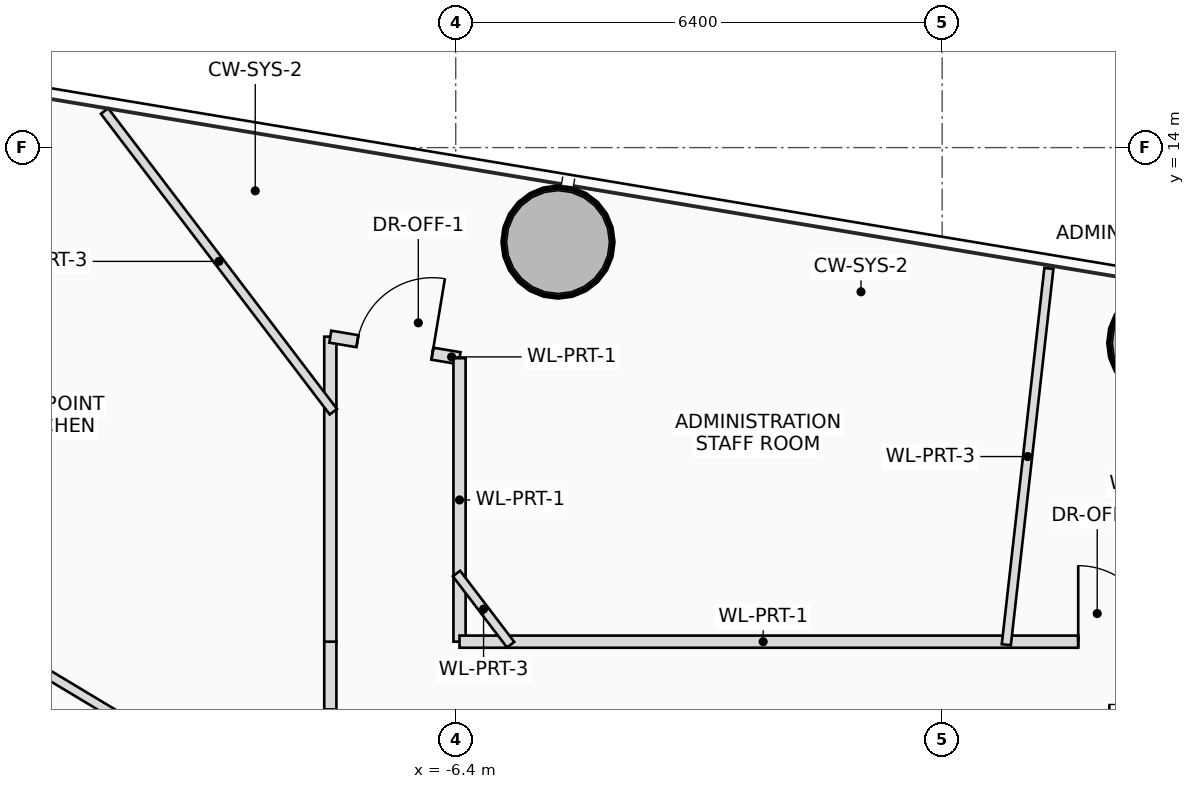
"""IFC4 building model, lengths in metres.
Left out: names, types, materials, properties, quantities, classifications, styles, units other than length and angle.
Written with IfcOpenShell. Run it as: python <this file> out.ifc"""

import sys

from ifc_helpers import new_model, si_unit, direction, frame, frame_2d, origin, origin_2d, place, context, subcontext, project, spatial, rectangle, hollow_circle, extrude, source, transform, mapped, element, fill, save


model = new_model("IFC4")
c1 = context("Model", 3, precision=1e-05, world=origin(), true_north=direction((0.0, 1.0)))
c2 = subcontext(c1, "Body", "Model", "MODEL_VIEW")
j1 = project(units=[si_unit("LENGTHUNIT", "METRE"), si_unit("PLANEANGLEUNIT", "RADIAN")], contexts=[c1])
p1 = place(None, origin())
s1 = spatial("IfcSite", under=j1, at=p1, CompositionType="ELEMENT")
p2 = place(p1, origin())
s2 = spatial("IfcBuilding", under=s1, at=p2, CompositionType="ELEMENT")
p3 = place(p2, frame((0.0, 0.0, 89.9)))
s3 = spatial("IfcBuildingStorey", under=s2, at=p3, CompositionType="ELEMENT", Elevation=89.9)
m1 = source(origin(), c2, "Body", "SweptSolid", [
    extrude(hollow_circle(Radius=0.725, WallThickness=0.05, at=origin_2d()), origin(), (0.0, 0.0, 1.0), 3.75),
])
for number, where, z_axis, x_axis in (
    (1, (2.915, 11.429, 0.0), (0.0, 0.0, 1.0), (1.0, 0.0, 0.0)),
    (2, (-5.054, 12.757, 0.0), (0.0, 0.0, 1.0), (1.0, 0.0, 0.0)),
):
    element("IfcColumn", number, at=place(p3, frame(where, z_axis=z_axis, x_axis=x_axis)), inside=s3, PredefinedType="COLUMN", context=c2, shape_type="MappedRepresentation", body=[
        mapped(m1, transform((0.0, 0.0, 0.0), scale=1.0)),
    ])
p4 = place(p3, frame((-8.05, -7.5, 0.0), z_axis=(0.0, 0.0, 1.0), x_axis=(0.0, 1.0, 0.0)))
e3 = element("IfcWall", 3, at=p4, inside=s3, PredefinedType="PARTITIONING", context=c2, shape_type="SweptSolid", body=[
    extrude(rectangle(XDim=15.0, YDim=0.16, at=frame_2d((7.5, 0.0))), origin(), (0.0, 0.0, 1.0), 2.85),
])
p5 = place(p4, frame((3.292, 0.0, 0.0)))
e4 = element("IfcOpeningElement", 4, at=p5, cuts=e3, PredefinedType="OPENING", context=c2, shape_type="SweptSolid", body=[
    extrude(rectangle(XDim=1.0, YDim=2.25, at=frame_2d((0.5, 1.125))), frame((0.0, 0.09, 0.0), z_axis=(0.0, -1.0, 0.0), x_axis=(1.0, 0.0, 0.0)), (0.0, 0.0, 1.0), 0.18),
])
p6 = place(p4, frame((8.524, 0.0, 0.0)))
e5 = element("IfcOpeningElement", 5, at=p6, cuts=e3, PredefinedType="OPENING", context=c2, shape_type="SweptSolid", body=[
    extrude(rectangle(XDim=1.0, YDim=2.25, at=frame_2d((0.5, 1.125))), frame((0.0, 0.09, 0.0), z_axis=(0.0, -1.0, 0.0), x_axis=(1.0, 0.0, 0.0)), (0.0, 0.0, 1.0), 0.18),
])
p7 = place(p4, frame((13.105, 0.0, 0.0)))
e6 = element("IfcOpeningElement", 6, at=p7, cuts=e3, PredefinedType="OPENING", context=c2, shape_type="SweptSolid", body=[
    extrude(rectangle(XDim=1.0, YDim=2.25, at=frame_2d((0.5, 1.125))), frame((0.0, 0.09, 0.0), z_axis=(0.0, -1.0, 0.0), x_axis=(1.0, 0.0, 0.0)), (0.0, 0.0, 1.0), 0.18),
])
p8 = place(p3, frame((-8.05, 7.5, 0.0), z_axis=(0.0, 0.0, 1.0), x_axis=(0.0, 1.0, 0.0)))
e7 = element("IfcWall", 7, at=p8, inside=s3, PredefinedType="PARTITIONING", context=c2, shape_type="SweptSolid", body=[
    extrude(rectangle(XDim=4.012, YDim=0.16, at=frame_2d((2.006, 0.0))), origin(), (0.0, 0.0, 1.0), 2.85),
])
p9 = place(p3, frame((-8.05, 11.512, 0.0), z_axis=(0.0, 0.0, 1.0), x_axis=(0.986405407683, -0.164330069354, 0.0)))
e8 = element("IfcWall", 8, at=p9, inside=s3, PredefinedType="PARTITIONING", context=c2, shape_type="SweptSolid", body=[
    extrude(rectangle(XDim=1.723, YDim=0.16, at=frame_2d((0.862, 0.0))), origin(), (0.0, 0.0, 1.0), 3.545),
])
p10 = place(p9, frame((0.362, 0.0, 0.0)))
e9 = element("IfcOpeningElement", 9, at=p10, cuts=e8, PredefinedType="OPENING", context=c2, shape_type="SweptSolid", body=[
    extrude(rectangle(XDim=1.0, YDim=2.25, at=frame_2d((0.5, 1.125))), frame((0.0, 0.09, 0.0), z_axis=(0.0, -1.0, 0.0), x_axis=(1.0, 0.0, 0.0)), (0.0, 0.0, 1.0), 0.18),
])
p11 = place(p3, frame((-6.35, 11.229, 0.0), z_axis=(0.0, 0.0, 1.0), x_axis=(0.0, -1.0, 0.0)))
e10 = element("IfcWall", 10, at=p11, inside=s3, PredefinedType="PARTITIONING", context=c2, shape_type="SweptSolid", body=[
    extrude(rectangle(XDim=3.729, YDim=0.16, at=frame_2d((1.865, 0.0))), origin(), (0.0, 0.0, 1.0), 3.05),
])
p12 = place(p3, frame((-6.35, 7.5, 0.0), z_axis=(0.0, 0.0, 1.0), x_axis=(1.0, 0.0, 0.0)))
e11 = element("IfcWall", 11, at=p12, inside=s3, PredefinedType="PARTITIONING", context=c2, shape_type="SweptSolid", body=[
    extrude(rectangle(XDim=12.7, YDim=0.16, at=frame_2d((6.35, 0.0))), origin(), (0.0, 0.0, 1.0), 2.85),
])
p13 = place(p12, frame((8.14, 0.0, 0.0)))
e12 = element("IfcOpeningElement", 12, at=p13, cuts=e11, PredefinedType="OPENING", context=c2, shape_type="SweptSolid", body=[
    extrude(rectangle(XDim=1.0, YDim=2.25, at=frame_2d((0.5, 1.125))), frame((0.0, 0.09, 0.0), z_axis=(0.0, -1.0, 0.0), x_axis=(1.0, 0.0, 0.0)), (0.0, 0.0, 1.0), 0.18),
])
p14 = place(p12, frame((10.799, 0.0, 0.0)))
e13 = element("IfcOpeningElement", 13, at=p14, cuts=e11, PredefinedType="OPENING", context=c2, shape_type="SweptSolid", body=[
    extrude(rectangle(XDim=1.0, YDim=2.25, at=frame_2d((0.5, 1.125))), frame((0.0, 0.09, 0.0), z_axis=(0.0, -1.0, 0.0), x_axis=(1.0, 0.0, 0.0)), (0.0, 0.0, 1.0), 0.18),
])
p15 = place(p3, frame((-8.01, 4.813, 0.0), z_axis=(0.0, 0.0, 1.0), x_axis=(-0.857173493242, 0.515027768653, 0.0)))
e14 = element("IfcWall", 14, at=p15, inside=s3, PredefinedType="PARTITIONING", context=c2, shape_type="SweptSolid", body=[
    extrude(rectangle(XDim=11.605, YDim=0.12, at=frame_2d((5.803, 0.0))), origin(), (0.0, 0.0, 1.0), 2.85),
])
p16 = place(p3, frame((0.844, 7.46, 0.0), z_axis=(0.0, 0.0, 1.0), x_axis=(0.112405035284, 0.99366247189, 0.0)))
e15 = element("IfcWall", 15, at=p16, inside=s3, PredefinedType="PARTITIONING", context=c2, shape_type="SweptSolid", body=[
    extrude(rectangle(XDim=4.982, YDim=0.12, at=frame_2d((2.491, 0.0))), origin(), (0.0, 0.0, 1.0), 3.01),
])
p17 = place(p3, frame((-5.677, 7.46, 0.0), z_axis=(0.0, 0.0, 1.0), x_axis=(-0.605430415, 0.795898242612, 0.0)))
e16 = element("IfcWall", 16, at=p17, inside=s3, PredefinedType="PARTITIONING", context=c2, shape_type="SweptSolid", body=[
    extrude(rectangle(XDim=1.177, YDim=0.12, at=frame_2d((0.588, 0.0))), origin(), (0.0, 0.0, 1.0), 2.85),
])
p18 = place(p3, frame((-8.01, 10.525, 0.0), z_axis=(0.0, 0.0, 1.0), x_axis=(-0.605587414203, 0.79577879072, 0.0)))
e17 = element("IfcWall", 17, at=p18, inside=s3, PredefinedType="PARTITIONING", context=c2, shape_type="SweptSolid", body=[
    extrude(rectangle(XDim=4.972, YDim=0.12, at=frame_2d((2.486, 0.0))), origin(), (0.0, 0.0, 1.0), 3.01),
])
p19 = place(p10, origin())
e18 = element("IfcDoor", 18, at=p19, inside=s3, OperationType="SINGLE_SWING_RIGHT", PredefinedType="DOOR", context=c2, shape_type="SweptSolid", body=[
    extrude(rectangle(XDim=1.0, YDim=2.25, at=frame_2d((0.5, 1.125))), frame((0.0, 0.025, 0.0), z_axis=(0.0, -1.0, 0.0), x_axis=(1.0, 0.0, 0.0)), (0.0, 0.0, 1.0), 0.05),
])
fill(e9, e18)
p20 = place(p13, origin())
e19 = element("IfcDoor", 19, at=p20, inside=s3, OperationType="SINGLE_SWING_LEFT", PredefinedType="DOOR", context=c2, shape_type="SweptSolid", body=[
    extrude(rectangle(XDim=1.0, YDim=2.25, at=frame_2d((0.5, 1.125))), frame((0.0, 0.025, 0.0), z_axis=(0.0, -1.0, 0.0), x_axis=(1.0, 0.0, 0.0)), (0.0, 0.0, 1.0), 0.05),
])
fill(e12, e19)
save(model, sys.argv[1])
